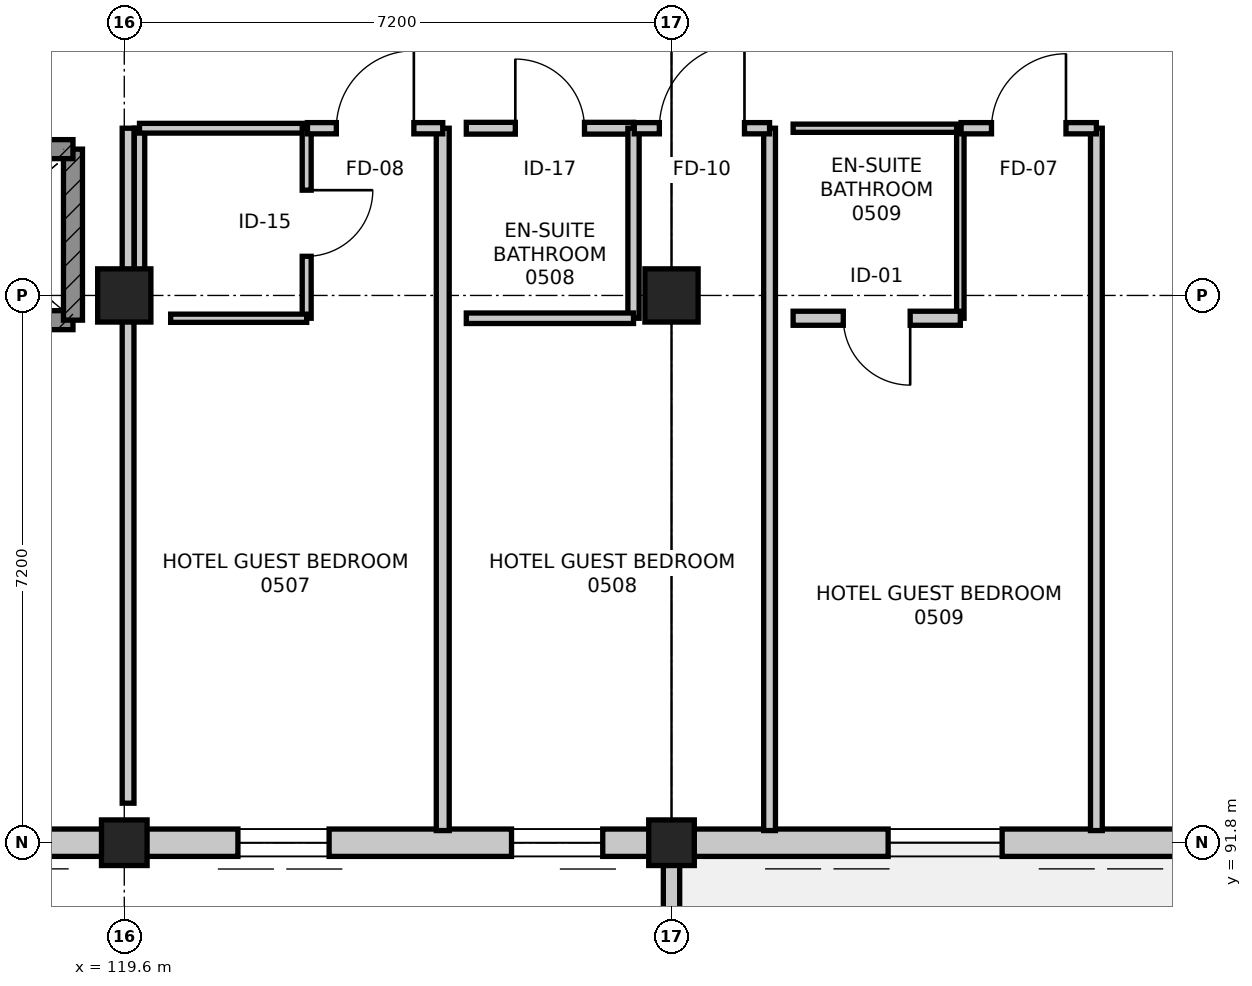
"""IFC4 building model, lengths in metres.
Left out: names, types, materials, properties, quantities, classifications, styles, units other than length and angle.
Written with IfcOpenShell. Run it as: python <this file> out.ifc"""

import sys

from ifc_helpers import new_model, si_unit, direction, frame, frame_2d, origin, origin_2d, place, context, subcontext, project, spatial, rectangle, extrude, element, fill, save


model = new_model("IFC4")
c1 = context("Model", 3, precision=1e-05, world=origin(), true_north=direction((0.0, 1.0)))
c2 = subcontext(c1, "Body", "Model", "MODEL_VIEW")
j1 = project(units=[si_unit("LENGTHUNIT", "METRE"), si_unit("PLANEANGLEUNIT", "RADIAN")], contexts=[c1])
p1 = place(None, origin())
s1 = spatial("IfcSite", under=j1, at=p1, CompositionType="ELEMENT")
p2 = place(p1, origin())
s2 = spatial("IfcBuilding", under=s1, at=p2, CompositionType="ELEMENT")
p3 = place(p2, frame((0.0, 0.0, 22.8)))
s3 = spatial("IfcBuildingStorey", under=s2, at=p3, CompositionType="ELEMENT", Elevation=22.8)
p4 = place(p3, frame((119.6, 91.8, 0.0), z_axis=(0.0, 0.0, 1.0), x_axis=(1.0, 0.0, 0.0)))
e1 = element("IfcColumn", 1, at=p4, inside=s3, PredefinedType="COLUMN", context=c2, shape_type="SweptSolid", body=[
    extrude(rectangle(XDim=0.6, YDim=0.6, at=origin_2d()), origin(), (0.0, 0.0, 1.0), 3.6),
])
p5 = place(p3, frame((119.6, 99.0, 0.0), z_axis=(0.0, 0.0, 1.0), x_axis=(1.0, 0.0, 0.0)))
e2 = element("IfcColumn", 2, at=p5, inside=s3, PredefinedType="COLUMN", context=c2, shape_type="SweptSolid", body=[
    extrude(rectangle(XDim=0.7, YDim=0.7, at=origin_2d()), origin(), (0.0, 0.0, 1.0), 3.6),
])
p6 = place(p3, frame((126.8, 91.8, 0.0), z_axis=(0.0, 0.0, 1.0), x_axis=(1.0, 0.0, 0.0)))
e3 = element("IfcColumn", 3, at=p6, inside=s3, PredefinedType="COLUMN", context=c2, shape_type="SweptSolid", body=[
    extrude(rectangle(XDim=0.6, YDim=0.6, at=origin_2d()), origin(), (0.0, 0.0, 1.0), 3.6),
])
p7 = place(p3, frame((126.8, 99.0, 0.0), z_axis=(0.0, 0.0, 1.0), x_axis=(1.0, 0.0, 0.0)))
e4 = element("IfcColumn", 4, at=p7, inside=s3, PredefinedType="COLUMN", context=c2, shape_type="SweptSolid", body=[
    extrude(rectangle(XDim=0.7, YDim=0.7, at=origin_2d()), origin(), (0.0, 0.0, 1.0), 3.6),
])
p8 = place(p3, frame((134.0, 91.8, 0.0), z_axis=(0.0, 0.0, 1.0), x_axis=(-1.0, 0.0, 0.0)))
e5 = element("IfcWall", 5, at=p8, inside=s3, PredefinedType="STANDARD", context=c2, shape_type="SweptSolid", body=[
    extrude(rectangle(XDim=7.2, YDim=0.36, at=frame_2d((3.6, 0.0))), origin(), (0.0, 0.0, 1.0), 2.735),
])
p9 = place(p8, frame((2.85, 0.0, 0.75)))
e6 = element("IfcOpeningElement", 6, at=p9, cuts=e5, PredefinedType="OPENING", context=c2, shape_type="SweptSolid", body=[
    extrude(rectangle(XDim=1.5, YDim=1.5, at=frame_2d((0.75, 0.75))), frame((0.0, 0.19, 0.0), z_axis=(0.0, -1.0, 0.0), x_axis=(1.0, 0.0, 0.0)), (0.0, 0.0, 1.0), 0.38),
])
p10 = place(p3, frame((126.8, 91.8, 0.0), z_axis=(0.0, 0.0, 1.0), x_axis=(-1.0, 0.0, 0.0)))
e7 = element("IfcWall", 7, at=p10, inside=s3, PredefinedType="STANDARD", context=c2, shape_type="SweptSolid", body=[
    extrude(rectangle(XDim=7.2, YDim=0.36, at=frame_2d((3.6, 0.0))), origin(), (0.0, 0.0, 1.0), 2.735),
])
p11 = place(p10, frame((0.905, 0.0, 0.75)))
e8 = element("IfcOpeningElement", 8, at=p11, cuts=e7, PredefinedType="OPENING", context=c2, shape_type="SweptSolid", body=[
    extrude(rectangle(XDim=1.2, YDim=1.5, at=frame_2d((0.6, 0.75))), frame((0.0, 0.19, 0.0), z_axis=(0.0, -1.0, 0.0), x_axis=(1.0, 0.0, 0.0)), (0.0, 0.0, 1.0), 0.38),
])
p12 = place(p10, frame((4.505, 0.0, 0.75)))
e9 = element("IfcOpeningElement", 9, at=p12, cuts=e7, PredefinedType="OPENING", context=c2, shape_type="SweptSolid", body=[
    extrude(rectangle(XDim=1.2, YDim=1.5, at=frame_2d((0.6, 0.75))), frame((0.0, 0.19, 0.0), z_axis=(0.0, -1.0, 0.0), x_axis=(1.0, 0.0, 0.0)), (0.0, 0.0, 1.0), 0.38),
])
p13 = place(p3, frame((119.6, 91.8, 0.0), z_axis=(0.0, 0.0, 1.0), x_axis=(-1.0, 0.0, 0.0)))
e10 = element("IfcWall", 10, at=p13, inside=s3, PredefinedType="STANDARD", context=c2, shape_type="SweptSolid", body=[
    extrude(rectangle(XDim=7.2, YDim=0.36, at=frame_2d((3.6, 0.0))), origin(), (0.0, 0.0, 1.0), 2.735),
])
p14 = place(p13, frame((1.488, 0.0, 0.75)))
e11 = element("IfcOpeningElement", 11, at=p14, cuts=e10, PredefinedType="OPENING", context=c2, shape_type="SweptSolid", body=[
    extrude(rectangle(XDim=1.2, YDim=1.5, at=frame_2d((0.6, 0.75))), frame((0.0, 0.19, 0.0), z_axis=(0.0, -1.0, 0.0), x_axis=(1.0, 0.0, 0.0)), (0.0, 0.0, 1.0), 0.38),
])
p15 = place(p13, frame((4.8, 0.0, 0.75)))
e12 = element("IfcOpeningElement", 12, at=p15, cuts=e10, PredefinedType="OPENING", context=c2, shape_type="SweptSolid", body=[
    extrude(rectangle(XDim=1.2, YDim=1.5, at=frame_2d((0.6, 0.75))), frame((0.0, 0.19, 0.0), z_axis=(0.0, -1.0, 0.0), x_axis=(1.0, 0.0, 0.0)), (0.0, 0.0, 1.0), 0.38),
])
p16 = place(p3, frame((126.8, 55.8, 0.0), z_axis=(0.0, 0.0, 1.0), x_axis=(0.0, 1.0, 0.0)))
e13 = element("IfcWall", 13, at=p16, inside=s3, PredefinedType="PARAPET", context=c2, shape_type="SweptSolid", body=[
    extrude(rectangle(XDim=36.0, YDim=0.215, at=frame_2d((18.0, 0.0))), origin(), (0.0, 0.0, 1.0), 1.15),
])
p17 = place(p3, frame((116.275, 98.675, 0.0), z_axis=(0.0, 0.0, 1.0), x_axis=(1.0, 0.0, 0.0)))
e14 = element("IfcWall", 14, at=p17, inside=s3, PredefinedType="SHEAR", context=c2, shape_type="SweptSolid", body=[
    extrude(rectangle(XDim=2.65, YDim=0.25, at=frame_2d((1.325, 0.0))), origin(), (0.0, 0.0, 1.0), 3.35),
])
p18 = place(p3, frame((118.925, 98.675, 0.0), z_axis=(0.0, 0.0, 1.0), x_axis=(0.0, 1.0, 0.0)))
e15 = element("IfcWall", 15, at=p18, inside=s3, PredefinedType="SHEAR", context=c2, shape_type="SweptSolid", body=[
    extrude(rectangle(XDim=2.25, YDim=0.25, at=frame_2d((1.125, 0.0))), origin(), (0.0, 0.0, 1.0), 3.35),
])
p19 = place(p3, frame((118.925, 100.925, 0.0), z_axis=(0.0, 0.0, 1.0), x_axis=(-1.0, 0.0, 0.0)))
e16 = element("IfcWall", 16, at=p19, inside=s3, PredefinedType="SHEAR", context=c2, shape_type="SweptSolid", body=[
    extrude(rectangle(XDim=2.65, YDim=0.25, at=frame_2d((1.325, 0.0))), origin(), (0.0, 0.0, 1.0), 3.35),
])
p20 = place(p19, frame((0.775, 0.0, 0.0)))
e17 = element("IfcOpeningElement", 17, at=p20, cuts=e16, PredefinedType="OPENING", context=c2, shape_type="SweptSolid", body=[
    extrude(rectangle(XDim=1.1, YDim=2.15, at=frame_2d((0.55, 1.075))), frame((0.0, 0.135, 0.0), z_axis=(0.0, -1.0, 0.0), x_axis=(1.0, 0.0, 0.0)), (0.0, 0.0, 1.0), 0.27),
])
p21 = place(p3, frame((119.8, 99.11, 0.0), z_axis=(0.0, 0.0, 1.0), x_axis=(0.0, 1.0, 0.0)))
e18 = element("IfcWall", 18, at=p21, inside=s3, PredefinedType="PARTITIONING", context=c2, shape_type="SweptSolid", body=[
    extrude(rectangle(XDim=2.09, YDim=0.138, at=frame_2d((1.045, 0.0))), origin(), (0.0, 0.0, 1.0), 2.685),
])
p22 = place(p3, frame((119.8, 101.2, 0.0), z_axis=(0.0, 0.0, 1.0), x_axis=(1.0, 0.0, 0.0)))
e19 = element("IfcWall", 19, at=p22, inside=s3, PredefinedType="PARTITIONING", context=c2, shape_type="SweptSolid", body=[
    extrude(rectangle(XDim=2.2, YDim=0.128, at=frame_2d((1.1, 0.0))), origin(), (0.0, 0.0, 1.0), 2.685),
])
p23 = place(p3, frame((122.0, 101.2, 0.0), z_axis=(0.0, 0.0, 1.0), x_axis=(0.0, -1.0, 0.0)))
e20 = element("IfcWall", 20, at=p23, inside=s3, PredefinedType="PARTITIONING", context=c2, shape_type="SweptSolid", body=[
    extrude(rectangle(XDim=2.5, YDim=0.118, at=frame_2d((1.25, 0.0))), origin(), (0.0, 0.0, 1.0), 2.735),
])
p24 = place(p23, frame((0.815, 0.0, 0.0)))
e21 = element("IfcOpeningElement", 21, at=p24, cuts=e20, PredefinedType="OPENING", context=c2, shape_type="SweptSolid", body=[
    extrude(rectangle(XDim=0.87, YDim=2.07, at=frame_2d((0.435, 1.035))), frame((0.0, 0.069, 0.0), z_axis=(0.0, -1.0, 0.0), x_axis=(1.0, 0.0, 0.0)), (0.0, 0.0, 1.0), 0.138),
])
p25 = place(p3, frame((122.0, 98.7, 0.0), z_axis=(0.0, 0.0, 1.0), x_axis=(-1.0, 0.0, 0.0)))
e22 = element("IfcWall", 22, at=p25, inside=s3, PredefinedType="PARTITIONING", context=c2, shape_type="SweptSolid", body=[
    extrude(rectangle(XDim=1.79, YDim=0.108, at=frame_2d((0.895, 0.0))), origin(), (0.0, 0.0, 1.0), 3.35),
])
p26 = place(p3, frame((123.79, 101.2, 0.0), z_axis=(0.0, 0.0, 1.0), x_axis=(0.0, -1.0, 0.0)))
e23 = element("IfcWall", 23, at=p26, inside=s3, PredefinedType="PARTITIONING", context=c2, shape_type="SweptSolid", body=[
    extrude(rectangle(XDim=9.24, YDim=0.17, at=frame_2d((4.62, 0.0))), origin(), (0.0, 0.0, 1.0), 2.735),
])
p27 = place(p3, frame((119.65, 92.32, 0.0), z_axis=(0.0, 0.0, 1.0), x_axis=(0.0, 1.0, 0.0)))
e24 = element("IfcWall", 24, at=p27, inside=s3, PredefinedType="PARTITIONING", context=c2, shape_type="SweptSolid", body=[
    extrude(rectangle(XDim=8.88, YDim=0.155, at=frame_2d((4.44, 0.0))), origin(), (0.0, 0.0, 1.0), 2.685),
])
p28 = place(p3, frame((122.01, 101.2, 0.0), z_axis=(0.0, 0.0, 1.0), x_axis=(1.0, 0.0, 0.0)))
e25 = element("IfcWall", 25, at=p28, inside=s3, PredefinedType="PARTITIONING", context=c2, shape_type="SweptSolid", body=[
    extrude(rectangle(XDim=1.78, YDim=0.148, at=frame_2d((0.89, 0.0))), origin(), (0.0, 0.0, 1.0), 3.35),
])
p29 = place(p28, frame((0.38, 0.0, 0.0)))
e26 = element("IfcOpeningElement", 26, at=p29, cuts=e25, PredefinedType="OPENING", context=c2, shape_type="SweptSolid", body=[
    extrude(rectangle(XDim=1.02, YDim=2.15, at=frame_2d((0.51, 1.075))), frame((0.0, 0.084, 0.0), z_axis=(0.0, -1.0, 0.0), x_axis=(1.0, 0.0, 0.0)), (0.0, 0.0, 1.0), 0.168),
])
p30 = place(p3, frame((124.1, 101.2, 0.0), z_axis=(0.0, 0.0, 1.0), x_axis=(1.0, 0.0, 0.0)))
e27 = element("IfcWall", 27, at=p30, inside=s3, PredefinedType="PARTITIONING", context=c2, shape_type="SweptSolid", body=[
    extrude(rectangle(XDim=2.2, YDim=0.155, at=frame_2d((1.1, 0.0))), origin(), (0.0, 0.0, 1.0), 3.35),
])
p31 = place(p30, frame((0.645, 0.0, 0.0)))
e28 = element("IfcOpeningElement", 28, at=p31, cuts=e27, PredefinedType="OPENING", context=c2, shape_type="SweptSolid", body=[
    extrude(rectangle(XDim=0.91, YDim=2.11, at=frame_2d((0.455, 1.055))), frame((0.0, 0.087, 0.0), z_axis=(0.0, -1.0, 0.0), x_axis=(1.0, 0.0, 0.0)), (0.0, 0.0, 1.0), 0.175),
])
p32 = place(p3, frame((126.3, 101.2, 0.0), z_axis=(0.0, 0.0, 1.0), x_axis=(0.0, -1.0, 0.0)))
e29 = element("IfcWall", 29, at=p32, inside=s3, PredefinedType="PARTITIONING", context=c2, shape_type="SweptSolid", body=[
    extrude(rectangle(XDim=2.5, YDim=0.148, at=frame_2d((1.25, 0.0))), origin(), (0.0, 0.0, 1.0), 2.735),
])
p33 = place(p3, frame((126.3, 98.7, 0.0), z_axis=(0.0, 0.0, 1.0), x_axis=(-1.0, 0.0, 0.0)))
e30 = element("IfcWall", 30, at=p33, inside=s3, PredefinedType="PARTITIONING", context=c2, shape_type="SweptSolid", body=[
    extrude(rectangle(XDim=2.2, YDim=0.138, at=frame_2d((1.1, 0.0))), origin(), (0.0, 0.0, 1.0), 3.35),
])
p34 = place(p3, frame((128.09, 101.2, 0.0), z_axis=(0.0, 0.0, 1.0), x_axis=(0.0, -1.0, 0.0)))
e31 = element("IfcWall", 31, at=p34, inside=s3, PredefinedType="PARTITIONING", context=c2, shape_type="SweptSolid", body=[
    extrude(rectangle(XDim=9.24, YDim=0.155, at=frame_2d((4.62, 0.0))), origin(), (0.0, 0.0, 1.0), 2.735),
])
p35 = place(p3, frame((126.31, 101.2, 0.0), z_axis=(0.0, 0.0, 1.0), x_axis=(1.0, 0.0, 0.0)))
e32 = element("IfcWall", 32, at=p35, inside=s3, PredefinedType="PARTITIONING", context=c2, shape_type="SweptSolid", body=[
    extrude(rectangle(XDim=1.78, YDim=0.148, at=frame_2d((0.89, 0.0))), origin(), (0.0, 0.0, 1.0), 2.685),
])
p36 = place(p35, frame((0.33, 0.0, 0.0)))
e33 = element("IfcOpeningElement", 33, at=p36, cuts=e32, PredefinedType="OPENING", context=c2, shape_type="SweptSolid", body=[
    extrude(rectangle(XDim=1.12, YDim=2.2, at=frame_2d((0.56, 1.1))), frame((0.0, 0.084, 0.0), z_axis=(0.0, -1.0, 0.0), x_axis=(1.0, 0.0, 0.0)), (0.0, 0.0, 1.0), 0.168),
])
p37 = place(p3, frame((128.4, 101.2, 0.0), z_axis=(0.0, 0.0, 1.0), x_axis=(1.0, 0.0, 0.0)))
e34 = element("IfcWall", 34, at=p37, inside=s3, PredefinedType="PARTITIONING", context=c2, shape_type="SweptSolid", body=[
    extrude(rectangle(XDim=2.2, YDim=0.108, at=frame_2d((1.1, 0.0))), origin(), (0.0, 0.0, 1.0), 3.35),
])
p38 = place(p3, frame((130.6, 101.2, 0.0), z_axis=(0.0, 0.0, 1.0), x_axis=(0.0, -1.0, 0.0)))
e35 = element("IfcWall", 35, at=p38, inside=s3, PredefinedType="PARTITIONING", context=c2, shape_type="SweptSolid", body=[
    extrude(rectangle(XDim=2.5, YDim=0.098, at=frame_2d((1.25, 0.0))), origin(), (0.0, 0.0, 1.0), 2.735),
])
p39 = place(p3, frame((130.6, 98.7, 0.0), z_axis=(0.0, 0.0, 1.0), x_axis=(-1.0, 0.0, 0.0)))
e36 = element("IfcWall", 36, at=p39, inside=s3, PredefinedType="PARTITIONING", context=c2, shape_type="SweptSolid", body=[
    extrude(rectangle(XDim=2.2, YDim=0.185, at=frame_2d((1.1, 0.0))), origin(), (0.0, 0.0, 1.0), 2.735),
])
p40 = place(p39, frame((0.66, 0.0, 0.0)))
e37 = element("IfcOpeningElement", 37, at=p40, cuts=e36, PredefinedType="OPENING", context=c2, shape_type="SweptSolid", body=[
    extrude(rectangle(XDim=0.88, YDim=2.06, at=frame_2d((0.44, 1.03))), frame((0.0, 0.103, 0.0), z_axis=(0.0, -1.0, 0.0), x_axis=(1.0, 0.0, 0.0)), (0.0, 0.0, 1.0), 0.205),
])
p41 = place(p3, frame((132.39, 101.2, 0.0), z_axis=(0.0, 0.0, 1.0), x_axis=(0.0, -1.0, 0.0)))
e38 = element("IfcWall", 38, at=p41, inside=s3, PredefinedType="PARTITIONING", context=c2, shape_type="SweptSolid", body=[
    extrude(rectangle(XDim=9.24, YDim=0.155, at=frame_2d((4.62, 0.0))), origin(), (0.0, 0.0, 1.0), 2.735),
])
p42 = place(p3, frame((130.61, 101.2, 0.0), z_axis=(0.0, 0.0, 1.0), x_axis=(1.0, 0.0, 0.0)))
e39 = element("IfcWall", 39, at=p42, inside=s3, PredefinedType="PARTITIONING", context=c2, shape_type="SweptSolid", body=[
    extrude(rectangle(XDim=1.78, YDim=0.148, at=frame_2d((0.89, 0.0))), origin(), (0.0, 0.0, 1.0), 3.35),
])
p43 = place(p42, frame((0.4, 0.0, 0.0)))
e40 = element("IfcOpeningElement", 40, at=p43, cuts=e39, PredefinedType="OPENING", context=c2, shape_type="SweptSolid", body=[
    extrude(rectangle(XDim=0.98, YDim=2.15, at=frame_2d((0.49, 1.075))), frame((0.0, 0.084, 0.0), z_axis=(0.0, -1.0, 0.0), x_axis=(1.0, 0.0, 0.0)), (0.0, 0.0, 1.0), 0.168),
])
p44 = place(p9, origin())
e41 = element("IfcWindow", 41, at=p44, inside=s3, PartitioningType="SINGLE_PANEL", PredefinedType="WINDOW", context=c2, shape_type="SweptSolid", body=[
    extrude(rectangle(XDim=1.5, YDim=1.5, at=frame_2d((0.75, 0.75))), frame((0.0, 0.03, 0.0), z_axis=(0.0, -1.0, 0.0), x_axis=(1.0, 0.0, 0.0)), (0.0, 0.0, 1.0), 0.06),
])
fill(e6, e41)
p45 = place(p11, origin())
e42 = element("IfcWindow", 42, at=p45, inside=s3, PartitioningType="SINGLE_PANEL", PredefinedType="WINDOW", context=c2, shape_type="SweptSolid", body=[
    extrude(rectangle(XDim=1.2, YDim=1.5, at=frame_2d((0.6, 0.75))), frame((0.0, 0.03, 0.0), z_axis=(0.0, -1.0, 0.0), x_axis=(1.0, 0.0, 0.0)), (0.0, 0.0, 1.0), 0.06),
])
fill(e8, e42)
p46 = place(p24, origin())
e43 = element("IfcDoor", 43, at=p46, inside=s3, OperationType="SINGLE_SWING_LEFT", PredefinedType="DOOR", context=c2, shape_type="SweptSolid", body=[
    extrude(rectangle(XDim=0.87, YDim=2.07, at=frame_2d((0.435, 1.035))), frame((0.0, 0.025, 0.0), z_axis=(0.0, -1.0, 0.0), x_axis=(1.0, 0.0, 0.0)), (0.0, 0.0, 1.0), 0.05),
])
fill(e21, e43)
p47 = place(p29, origin())
e44 = element("IfcDoor", 44, at=p47, inside=s3, OperationType="SINGLE_SWING_RIGHT", PredefinedType="DOOR", context=c2, shape_type="SweptSolid", body=[
    extrude(rectangle(XDim=1.02, YDim=2.15, at=frame_2d((0.51, 1.075))), frame((0.0, 0.025, 0.0), z_axis=(0.0, -1.0, 0.0), x_axis=(1.0, 0.0, 0.0)), (0.0, 0.0, 1.0), 0.05),
])
fill(e26, e44)
p48 = place(p31, origin())
e45 = element("IfcDoor", 45, at=p48, inside=s3, OperationType="SINGLE_SWING_LEFT", PredefinedType="DOOR", context=c2, shape_type="SweptSolid", body=[
    extrude(rectangle(XDim=0.91, YDim=2.11, at=frame_2d((0.455, 1.055))), frame((0.0, 0.025, 0.0), z_axis=(0.0, -1.0, 0.0), x_axis=(1.0, 0.0, 0.0)), (0.0, 0.0, 1.0), 0.05),
])
fill(e28, e45)
p49 = place(p36, origin())
e46 = element("IfcDoor", 46, at=p49, inside=s3, OperationType="SINGLE_SWING_RIGHT", PredefinedType="DOOR", context=c2, shape_type="SweptSolid", body=[
    extrude(rectangle(XDim=1.12, YDim=2.2, at=frame_2d((0.56, 1.1))), frame((0.0, 0.025, 0.0), z_axis=(0.0, -1.0, 0.0), x_axis=(1.0, 0.0, 0.0)), (0.0, 0.0, 1.0), 0.05),
])
fill(e33, e46)
p50 = place(p40, origin())
e47 = element("IfcDoor", 47, at=p50, inside=s3, OperationType="SINGLE_SWING_LEFT", PredefinedType="DOOR", context=c2, shape_type="SweptSolid", body=[
    extrude(rectangle(XDim=0.88, YDim=2.06, at=frame_2d((0.44, 1.03))), frame((0.0, 0.025, 0.0), z_axis=(0.0, -1.0, 0.0), x_axis=(1.0, 0.0, 0.0)), (0.0, 0.0, 1.0), 0.05),
])
fill(e37, e47)
p51 = place(p43, origin())
e48 = element("IfcDoor", 48, at=p51, inside=s3, OperationType="SINGLE_SWING_RIGHT", PredefinedType="DOOR", context=c2, shape_type="SweptSolid", body=[
    extrude(rectangle(XDim=0.98, YDim=2.15, at=frame_2d((0.49, 1.075))), frame((0.0, 0.025, 0.0), z_axis=(0.0, -1.0, 0.0), x_axis=(1.0, 0.0, 0.0)), (0.0, 0.0, 1.0), 0.05),
])
fill(e40, e48)
p52 = place(p12, origin())
e49 = element("IfcWindow", 49, at=p52, inside=s3, PartitioningType="SINGLE_PANEL", PredefinedType="WINDOW", context=c2, shape_type="SweptSolid", body=[
    extrude(rectangle(XDim=1.2, YDim=1.5, at=frame_2d((0.6, 0.75))), frame((0.0, 0.03, 0.0), z_axis=(0.0, -1.0, 0.0), x_axis=(1.0, 0.0, 0.0)), (0.0, 0.0, 1.0), 0.06),
])
fill(e9, e49)
save(model, sys.argv[1])
